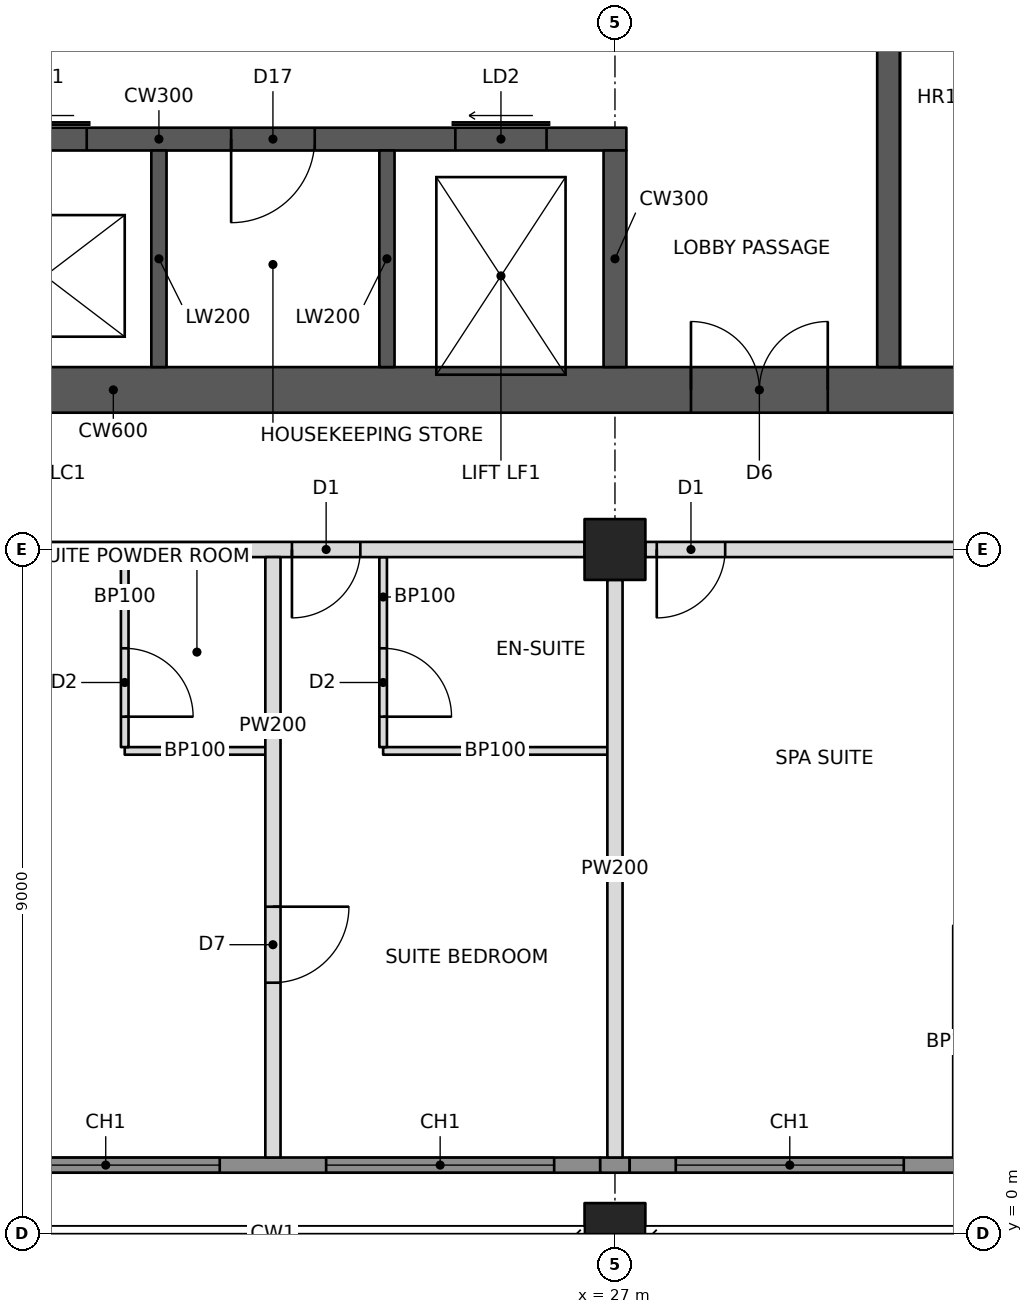
"""IFC4 building model, lengths in metres.
Left out: names, types, materials, properties, quantities, classifications, styles, units other than length and angle.
Written with IfcOpenShell. Run it as: python <this file> out.ifc"""

import sys

from ifc_helpers import new_model, si_unit, direction, frame, frame_2d, origin, origin_2d, place, context, subcontext, project, spatial, rectangle, hollow_rectangle, extrude, element, fill, save


model = new_model("IFC4")
c1 = context("Model", 3, precision=1e-05, world=origin(), true_north=direction((0.0, 1.0)))
c2 = subcontext(c1, "Body", "Model", "MODEL_VIEW")
j1 = project(units=[si_unit("LENGTHUNIT", "METRE"), si_unit("PLANEANGLEUNIT", "RADIAN")], contexts=[c1])
p1 = place(None, origin())
s1 = spatial("IfcSite", under=j1, at=p1, CompositionType="ELEMENT")
p2 = place(p1, origin())
s2 = spatial("IfcBuilding", under=s1, at=p2, CompositionType="ELEMENT")
p3 = place(p2, frame((0.0, 0.0, 194.4)))
s3 = spatial("IfcBuildingStorey", under=s2, at=p3, CompositionType="ELEMENT", Elevation=194.4)
p4 = place(p3, frame((27.0, 0.0, 0.0), z_axis=(0.0, 0.0, 1.0), x_axis=(1.0, 0.0, 0.0)))
e1 = element("IfcColumn", 1, at=p4, inside=s3, PredefinedType="COLUMN", context=c2, shape_type="SweptSolid", body=[
    extrude(hollow_rectangle(XDim=0.8, YDim=0.8, WallThickness=0.06, at=origin_2d()), origin(), (0.0, 0.0, 1.0), 3.4),
])
p5 = place(p3, frame((27.0, 9.0, 0.0), z_axis=(0.0, 0.0, 1.0), x_axis=(1.0, 0.0, 0.0)))
e2 = element("IfcColumn", 2, at=p5, inside=s3, PredefinedType="COLUMN", context=c2, shape_type="SweptSolid", body=[
    extrude(hollow_rectangle(XDim=0.8, YDim=0.8, WallThickness=0.05, at=origin_2d()), origin(), (0.0, 0.0, 1.0), 3.4),
])
p6 = place(p3, frame((10.8, 11.1, 0.0), z_axis=(0.0, 0.0, 1.0), x_axis=(1.0, 0.0, 0.0)))
e3 = element("IfcWall", 3, at=p6, inside=s3, PredefinedType="SHEAR", context=c2, shape_type="SweptSolid", body=[
    extrude(rectangle(XDim=23.4, YDim=0.6, at=frame_2d((11.7, 0.0))), origin(), (0.0, 0.0, 1.0), 3.4),
])
p7 = place(p6, frame((1.0, 0.0, 0.0)))
e4 = element("IfcOpeningElement", 4, at=p7, cuts=e3, PredefinedType="OPENING", context=c2, shape_type="SweptSolid", body=[
    extrude(rectangle(XDim=1.0, YDim=2.1, at=frame_2d((0.5, 1.05))), frame((0.0, 0.31, 0.0), z_axis=(0.0, -1.0, 0.0), x_axis=(1.0, 0.0, 0.0)), (0.0, 0.0, 1.0), 0.62),
])
p8 = place(p6, frame((17.2, 0.0, 0.0)))
e5 = element("IfcOpeningElement", 5, at=p8, cuts=e3, PredefinedType="OPENING", context=c2, shape_type="SweptSolid", body=[
    extrude(rectangle(XDim=1.8, YDim=2.1, at=frame_2d((0.9, 1.05))), frame((0.0, 0.31, 0.0), z_axis=(0.0, -1.0, 0.0), x_axis=(1.0, 0.0, 0.0)), (0.0, 0.0, 1.0), 0.62),
])
p9 = place(p3, frame((18.15, 14.4, 0.0), z_axis=(0.0, 0.0, 1.0), x_axis=(1.0, 0.0, 0.0)))
e6 = element("IfcWall", 6, at=p9, inside=s3, PredefinedType="SHEAR", context=c2, shape_type="SweptSolid", body=[
    extrude(rectangle(XDim=9.0, YDim=0.3, at=frame_2d((4.5, 0.0))), origin(), (0.0, 0.0, 1.0), 3.4),
])
p10 = place(p9, frame((0.8, 0.0, 0.0)))
e7 = element("IfcOpeningElement", 7, at=p10, cuts=e6, PredefinedType="OPENING", context=c2, shape_type="SweptSolid", body=[
    extrude(rectangle(XDim=1.1, YDim=2.1, at=frame_2d((0.55, 1.05))), frame((0.0, 0.16, 0.0), z_axis=(0.0, -1.0, 0.0), x_axis=(1.0, 0.0, 0.0)), (0.0, 0.0, 1.0), 0.32),
])
p11 = place(p9, frame((6.75, 0.0, 0.0)))
e8 = element("IfcOpeningElement", 8, at=p11, cuts=e6, PredefinedType="OPENING", context=c2, shape_type="SweptSolid", body=[
    extrude(rectangle(XDim=1.2, YDim=2.1, at=frame_2d((0.6, 1.05))), frame((0.0, 0.16, 0.0), z_axis=(0.0, -1.0, 0.0), x_axis=(1.0, 0.0, 0.0)), (0.0, 0.0, 1.0), 0.32),
])
p12 = place(p9, frame((3.8, 0.0, 0.0)))
e9 = element("IfcOpeningElement", 9, at=p12, cuts=e6, PredefinedType="OPENING", context=c2, shape_type="SweptSolid", body=[
    extrude(rectangle(XDim=1.1, YDim=2.1, at=frame_2d((0.55, 1.05))), frame((0.0, 0.16, 0.0), z_axis=(0.0, -1.0, 0.0), x_axis=(1.0, 0.0, 0.0)), (0.0, 0.0, 1.0), 0.32),
])
p13 = place(p3, frame((27.0, 11.4, 0.0), z_axis=(0.0, 0.0, 1.0), x_axis=(0.0, 1.0, 0.0)))
e10 = element("IfcWall", 10, at=p13, inside=s3, PredefinedType="SHEAR", context=c2, shape_type="SweptSolid", body=[
    extrude(rectangle(XDim=2.85, YDim=0.3, at=frame_2d((1.425, 0.0))), origin(), (0.0, 0.0, 1.0), 3.4),
])
for number, where, z_axis, x_axis in (
    (11, (21.0, 11.4, 0.0), (0.0, 0.0, 1.0), (0.0, 1.0, 0.0)),
    (12, (24.0, 11.4, 0.0), (0.0, 0.0, 1.0), (0.0, 1.0, 0.0)),
):
    element("IfcWall", number, at=place(p3, frame(where, z_axis=z_axis, x_axis=x_axis)), inside=s3, PredefinedType="SHEAR", context=c2, shape_type="SweptSolid", body=[
        extrude(rectangle(XDim=2.85, YDim=0.2, at=frame_2d((1.425, 0.0))), origin(), (0.0, 0.0, 1.0), 3.4),
    ])
p14 = place(p3, frame((30.6, 11.4, 0.0), z_axis=(0.0, 0.0, 1.0), x_axis=(0.0, 1.0, 0.0)))
e13 = element("IfcWall", 13, at=p14, inside=s3, PredefinedType="SHEAR", context=c2, shape_type="SweptSolid", body=[
    extrude(rectangle(XDim=13.2, YDim=0.3, at=frame_2d((6.6, 0.0))), origin(), (0.0, 0.0, 1.0), 3.4),
])
p15 = place(p3, frame((18.4, 9.0, 0.0), z_axis=(0.0, 0.0, 1.0), x_axis=(1.0, 0.0, 0.0)))
e14 = element("IfcWall", 14, at=p15, inside=s3, PredefinedType="PARTITIONING", context=c2, shape_type="SweptSolid", body=[
    extrude(rectangle(XDim=8.2, YDim=0.2, at=frame_2d((4.1, 0.0))), origin(), (0.0, 0.0, 1.0), 2.405),
])
p16 = place(p15, frame((4.35, 0.0, 0.0)))
e15 = element("IfcOpeningElement", 15, at=p16, cuts=e14, PredefinedType="OPENING", context=c2, shape_type="SweptSolid", body=[
    extrude(rectangle(XDim=0.9, YDim=2.1, at=frame_2d((0.45, 1.05))), frame((0.0, 0.11, 0.0), z_axis=(0.0, -1.0, 0.0), x_axis=(1.0, 0.0, 0.0)), (0.0, 0.0, 1.0), 0.22),
])
p17 = place(p3, frame((27.4, 9.0, 0.0), z_axis=(0.0, 0.0, 1.0), x_axis=(1.0, 0.0, 0.0)))
e16 = element("IfcWall", 16, at=p17, inside=s3, PredefinedType="PARTITIONING", context=c2, shape_type="SweptSolid", body=[
    extrude(rectangle(XDim=8.2, YDim=0.2, at=frame_2d((4.1, 0.0))), origin(), (0.0, 0.0, 1.0), 2.405),
])
p18 = place(p17, frame((0.15, 0.0, 0.0)))
e17 = element("IfcOpeningElement", 17, at=p18, cuts=e16, PredefinedType="OPENING", context=c2, shape_type="SweptSolid", body=[
    extrude(rectangle(XDim=0.9, YDim=2.1, at=frame_2d((0.45, 1.05))), frame((0.0, 0.11, 0.0), z_axis=(0.0, -1.0, 0.0), x_axis=(1.0, 0.0, 0.0)), (0.0, 0.0, 1.0), 0.22),
])
p19 = place(p3, frame((22.5, 8.9, 0.0), z_axis=(0.0, 0.0, 1.0), x_axis=(0.0, -1.0, 0.0)))
e18 = element("IfcWall", 18, at=p19, inside=s3, PredefinedType="PARTITIONING", context=c2, shape_type="SweptSolid", body=[
    extrude(rectangle(XDim=7.9, YDim=0.2, at=frame_2d((3.95, 0.0))), origin(), (0.0, 0.0, 1.0), 2.404),
])
p20 = place(p19, frame((4.6, 0.0, 0.0)))
e19 = element("IfcOpeningElement", 19, at=p20, cuts=e18, PredefinedType="OPENING", context=c2, shape_type="SweptSolid", body=[
    extrude(rectangle(XDim=1.0, YDim=2.1, at=frame_2d((0.5, 1.05))), frame((0.0, 0.11, 0.0), z_axis=(0.0, -1.0, 0.0), x_axis=(1.0, 0.0, 0.0)), (0.0, 0.0, 1.0), 0.22),
])
p21 = place(p3, frame((27.0, 8.6, 0.0), z_axis=(0.0, 0.0, 1.0), x_axis=(0.0, -1.0, 0.0)))
e20 = element("IfcWall", 20, at=p21, inside=s3, PredefinedType="PARTITIONING", context=c2, shape_type="SweptSolid", body=[
    extrude(rectangle(XDim=7.6, YDim=0.2, at=frame_2d((3.8, 0.0))), origin(), (0.0, 0.0, 1.0), 2.405),
])
p22 = place(p3, frame((20.55, 6.35, 0.0), z_axis=(0.0, 0.0, 1.0), x_axis=(1.0, 0.0, 0.0)))
e21 = element("IfcWall", 21, at=p22, inside=s3, PredefinedType="PARTITIONING", context=c2, shape_type="SweptSolid", body=[
    extrude(rectangle(XDim=1.85, YDim=0.1, at=frame_2d((0.925, 0.0))), origin(), (0.0, 0.0, 1.0), 3.2),
])
p23 = place(p3, frame((20.55, 8.9, 0.0), z_axis=(0.0, 0.0, 1.0), x_axis=(0.0, -1.0, 0.0)))
e22 = element("IfcWall", 22, at=p23, inside=s3, PredefinedType="PARTITIONING", context=c2, shape_type="SweptSolid", body=[
    extrude(rectangle(XDim=2.5, YDim=0.1, at=frame_2d((1.25, 0.0))), origin(), (0.0, 0.0, 1.0), 2.404),
])
p24 = place(p23, frame((1.2, 0.0, 0.0)))
e23 = element("IfcOpeningElement", 23, at=p24, cuts=e22, PredefinedType="OPENING", context=c2, shape_type="SweptSolid", body=[
    extrude(rectangle(XDim=0.9, YDim=2.1, at=frame_2d((0.45, 1.05))), frame((0.0, 0.06, 0.0), z_axis=(0.0, -1.0, 0.0), x_axis=(1.0, 0.0, 0.0)), (0.0, 0.0, 1.0), 0.12),
])
p25 = place(p3, frame((23.95, 6.35, 0.0), z_axis=(0.0, 0.0, 1.0), x_axis=(1.0, 0.0, 0.0)))
e24 = element("IfcWall", 24, at=p25, inside=s3, PredefinedType="PARTITIONING", context=c2, shape_type="SweptSolid", body=[
    extrude(rectangle(XDim=2.95, YDim=0.1, at=frame_2d((1.475, 0.0))), origin(), (0.0, 0.0, 1.0), 2.404),
])
p26 = place(p3, frame((23.95, 8.9, 0.0), z_axis=(0.0, 0.0, 1.0), x_axis=(0.0, -1.0, 0.0)))
e25 = element("IfcWall", 25, at=p26, inside=s3, PredefinedType="PARTITIONING", context=c2, shape_type="SweptSolid", body=[
    extrude(rectangle(XDim=2.5, YDim=0.1, at=frame_2d((1.25, 0.0))), origin(), (0.0, 0.0, 1.0), 2.404),
])
p27 = place(p26, frame((1.2, 0.0, 0.0)))
e26 = element("IfcOpeningElement", 26, at=p27, cuts=e25, PredefinedType="OPENING", context=c2, shape_type="SweptSolid", body=[
    extrude(rectangle(XDim=0.9, YDim=2.1, at=frame_2d((0.45, 1.05))), frame((0.0, 0.06, 0.0), z_axis=(0.0, -1.0, 0.0), x_axis=(1.0, 0.0, 0.0)), (0.0, 0.0, 1.0), 0.12),
])
p28 = place(p3, frame((18.194, 0.9, 0.0), z_axis=(0.0, 0.0, 1.0), x_axis=(1.0, 0.0, 0.0)))
e27 = element("IfcWall", 27, at=p28, inside=s3, PredefinedType="SOLIDWALL", context=c2, shape_type="SweptSolid", body=[
    extrude(rectangle(XDim=8.612, YDim=0.2, at=frame_2d((4.306, 0.0))), origin(), (0.0, 0.0, 1.0), 3.2),
])
p29 = place(p28, frame((0.606, 0.0, 0.6)))
e28 = element("IfcOpeningElement", 28, at=p29, cuts=e27, PredefinedType="OPENING", context=c2, shape_type="SweptSolid", body=[
    extrude(rectangle(XDim=3.0, YDim=2.2, at=frame_2d((1.5, 1.1))), frame((0.0, 0.11, 0.0), z_axis=(0.0, -1.0, 0.0), x_axis=(1.0, 0.0, 0.0)), (0.0, 0.0, 1.0), 0.22),
])
p30 = place(p28, frame((5.006, 0.0, 0.6)))
e29 = element("IfcOpeningElement", 29, at=p30, cuts=e27, PredefinedType="OPENING", context=c2, shape_type="SweptSolid", body=[
    extrude(rectangle(XDim=3.0, YDim=2.2, at=frame_2d((1.5, 1.1))), frame((0.0, 0.11, 0.0), z_axis=(0.0, -1.0, 0.0), x_axis=(1.0, 0.0, 0.0)), (0.0, 0.0, 1.0), 0.22),
])
p31 = place(p3, frame((26.806, 0.9, 0.0), z_axis=(0.0, 0.0, 1.0), x_axis=(1.0, 0.0, 0.0)))
e30 = element("IfcWall", 30, at=p31, inside=s3, PredefinedType="SOLIDWALL", context=c2, shape_type="SweptSolid", body=[
    extrude(rectangle(XDim=0.388, YDim=0.2, at=frame_2d((0.194, 0.0))), origin(), (0.0, 0.0, 1.0), 2.404),
])
p32 = place(p3, frame((27.194, 0.9, 0.0), z_axis=(0.0, 0.0, 1.0), x_axis=(1.0, 0.0, 0.0)))
e31 = element("IfcWall", 31, at=p32, inside=s3, PredefinedType="SOLIDWALL", context=c2, shape_type="SweptSolid", body=[
    extrude(rectangle(XDim=8.671, YDim=0.2, at=frame_2d((4.335, 0.0))), origin(), (0.0, 0.0, 1.0), 3.2),
])
p33 = place(p32, frame((0.606, 0.0, 0.6)))
e32 = element("IfcOpeningElement", 32, at=p33, cuts=e31, PredefinedType="OPENING", context=c2, shape_type="SweptSolid", body=[
    extrude(rectangle(XDim=3.0, YDim=2.2, at=frame_2d((1.5, 1.1))), frame((0.0, 0.11, 0.0), z_axis=(0.0, -1.0, 0.0), x_axis=(1.0, 0.0, 0.0)), (0.0, 0.0, 1.0), 0.22),
])
p34 = place(p32, frame((5.006, 0.0, 0.6)))
e33 = element("IfcOpeningElement", 33, at=p34, cuts=e31, PredefinedType="OPENING", context=c2, shape_type="SweptSolid", body=[
    extrude(rectangle(XDim=3.0, YDim=2.2, at=frame_2d((1.5, 1.1))), frame((0.0, 0.11, 0.0), z_axis=(0.0, -1.0, 0.0), x_axis=(1.0, 0.0, 0.0)), (0.0, 0.0, 1.0), 0.22),
])
p35 = place(p29, origin())
e34 = element("IfcWindow", 34, at=p35, inside=s3, PartitioningType="TRIPLE_PANEL_VERTICAL", PredefinedType="WINDOW", context=c2, shape_type="SweptSolid", body=[
    extrude(rectangle(XDim=3.0, YDim=2.2, at=frame_2d((1.5, 1.1))), frame((0.0, 0.03, 0.0), z_axis=(0.0, -1.0, 0.0), x_axis=(1.0, 0.0, 0.0)), (0.0, 0.0, 1.0), 0.06),
])
fill(e28, e34)
p36 = place(p30, origin())
e35 = element("IfcWindow", 35, at=p36, inside=s3, PartitioningType="TRIPLE_PANEL_VERTICAL", PredefinedType="WINDOW", context=c2, shape_type="SweptSolid", body=[
    extrude(rectangle(XDim=3.0, YDim=2.2, at=frame_2d((1.5, 1.1))), frame((0.0, 0.03, 0.0), z_axis=(0.0, -1.0, 0.0), x_axis=(1.0, 0.0, 0.0)), (0.0, 0.0, 1.0), 0.06),
])
fill(e29, e35)
p37 = place(p33, origin())
e36 = element("IfcWindow", 36, at=p37, inside=s3, PartitioningType="TRIPLE_PANEL_VERTICAL", PredefinedType="WINDOW", context=c2, shape_type="SweptSolid", body=[
    extrude(rectangle(XDim=3.0, YDim=2.2, at=frame_2d((1.5, 1.1))), frame((0.0, 0.03, 0.0), z_axis=(0.0, -1.0, 0.0), x_axis=(1.0, 0.0, 0.0)), (0.0, 0.0, 1.0), 0.06),
])
fill(e32, e36)
p38 = place(p20, origin())
e37 = element("IfcDoor", 37, at=p38, inside=s3, OperationType="SINGLE_SWING_LEFT", PredefinedType="DOOR", context=c2, shape_type="SweptSolid", body=[
    extrude(rectangle(XDim=1.0, YDim=2.1, at=frame_2d((0.5, 1.05))), frame((0.0, 0.025, 0.0), z_axis=(0.0, -1.0, 0.0), x_axis=(1.0, 0.0, 0.0)), (0.0, 0.0, 1.0), 0.05),
])
fill(e19, e37)
p39 = place(p24, origin())
e38 = element("IfcDoor", 38, at=p39, inside=s3, OperationType="SINGLE_SWING_RIGHT", PredefinedType="DOOR", context=c2, shape_type="SweptSolid", body=[
    extrude(rectangle(XDim=0.9, YDim=2.1, at=frame_2d((0.45, 1.05))), frame((0.0, 0.025, 0.0), z_axis=(0.0, -1.0, 0.0), x_axis=(1.0, 0.0, 0.0)), (0.0, 0.0, 1.0), 0.05),
])
fill(e23, e38)
p40 = place(p27, origin())
e39 = element("IfcDoor", 39, at=p40, inside=s3, OperationType="SINGLE_SWING_RIGHT", PredefinedType="DOOR", context=c2, shape_type="SweptSolid", body=[
    extrude(rectangle(XDim=0.9, YDim=2.1, at=frame_2d((0.45, 1.05))), frame((0.0, 0.025, 0.0), z_axis=(0.0, -1.0, 0.0), x_axis=(1.0, 0.0, 0.0)), (0.0, 0.0, 1.0), 0.05),
])
fill(e26, e39)
p41 = place(p16, frame((0.9, 0.0, 0.0), z_axis=(0.0, 0.0, 1.0), x_axis=(-1.0, 0.0, 0.0)))
e40 = element("IfcDoor", 40, at=p41, inside=s3, OperationType="SINGLE_SWING_RIGHT", PredefinedType="DOOR", context=c2, shape_type="SweptSolid", body=[
    extrude(rectangle(XDim=0.9, YDim=2.1, at=frame_2d((0.45, 1.05))), frame((0.0, 0.025, 0.0), z_axis=(0.0, -1.0, 0.0), x_axis=(1.0, 0.0, 0.0)), (0.0, 0.0, 1.0), 0.05),
])
fill(e15, e40)
p42 = place(p18, frame((0.9, 0.0, 0.0), z_axis=(0.0, 0.0, 1.0), x_axis=(-1.0, 0.0, 0.0)))
e41 = element("IfcDoor", 41, at=p42, inside=s3, OperationType="SINGLE_SWING_RIGHT", PredefinedType="DOOR", context=c2, shape_type="SweptSolid", body=[
    extrude(rectangle(XDim=0.9, YDim=2.1, at=frame_2d((0.45, 1.05))), frame((0.0, 0.025, 0.0), z_axis=(0.0, -1.0, 0.0), x_axis=(1.0, 0.0, 0.0)), (0.0, 0.0, 1.0), 0.05),
])
fill(e17, e41)
p43 = place(p8, origin())
e42 = element("IfcDoor", 42, at=p43, inside=s3, OperationType="DOUBLE_DOOR_SINGLE_SWING", PredefinedType="DOOR", context=c2, shape_type="SweptSolid", body=[
    extrude(rectangle(XDim=1.8, YDim=2.1, at=frame_2d((0.9, 1.05))), frame((0.0, 0.025, 0.0), z_axis=(0.0, -1.0, 0.0), x_axis=(1.0, 0.0, 0.0)), (0.0, 0.0, 1.0), 0.05),
])
fill(e5, e42)
p44 = place(p10, origin())
e43 = element("IfcDoor", 43, at=p44, inside=s3, OperationType="SLIDING_TO_LEFT", PredefinedType="DOOR", context=c2, shape_type="SweptSolid", body=[
    extrude(rectangle(XDim=1.1, YDim=2.1, at=frame_2d((0.55, 1.05))), frame((0.0, 0.025, 0.0), z_axis=(0.0, -1.0, 0.0), x_axis=(1.0, 0.0, 0.0)), (0.0, 0.0, 1.0), 0.05),
])
fill(e7, e43)
p45 = place(p11, origin())
e44 = element("IfcDoor", 44, at=p45, inside=s3, OperationType="SLIDING_TO_LEFT", PredefinedType="DOOR", context=c2, shape_type="SweptSolid", body=[
    extrude(rectangle(XDim=1.2, YDim=2.1, at=frame_2d((0.6, 1.05))), frame((0.0, 0.025, 0.0), z_axis=(0.0, -1.0, 0.0), x_axis=(1.0, 0.0, 0.0)), (0.0, 0.0, 1.0), 0.05),
])
fill(e8, e44)
p46 = place(p12, frame((1.1, 0.0, 0.0), z_axis=(0.0, 0.0, 1.0), x_axis=(-1.0, 0.0, 0.0)))
e45 = element("IfcDoor", 45, at=p46, inside=s3, OperationType="SINGLE_SWING_RIGHT", PredefinedType="DOOR", context=c2, shape_type="SweptSolid", body=[
    extrude(rectangle(XDim=1.1, YDim=2.1, at=frame_2d((0.55, 1.05))), frame((0.0, 0.025, 0.0), z_axis=(0.0, -1.0, 0.0), x_axis=(1.0, 0.0, 0.0)), (0.0, 0.0, 1.0), 0.05),
])
fill(e9, e45)
save(model, sys.argv[1])
